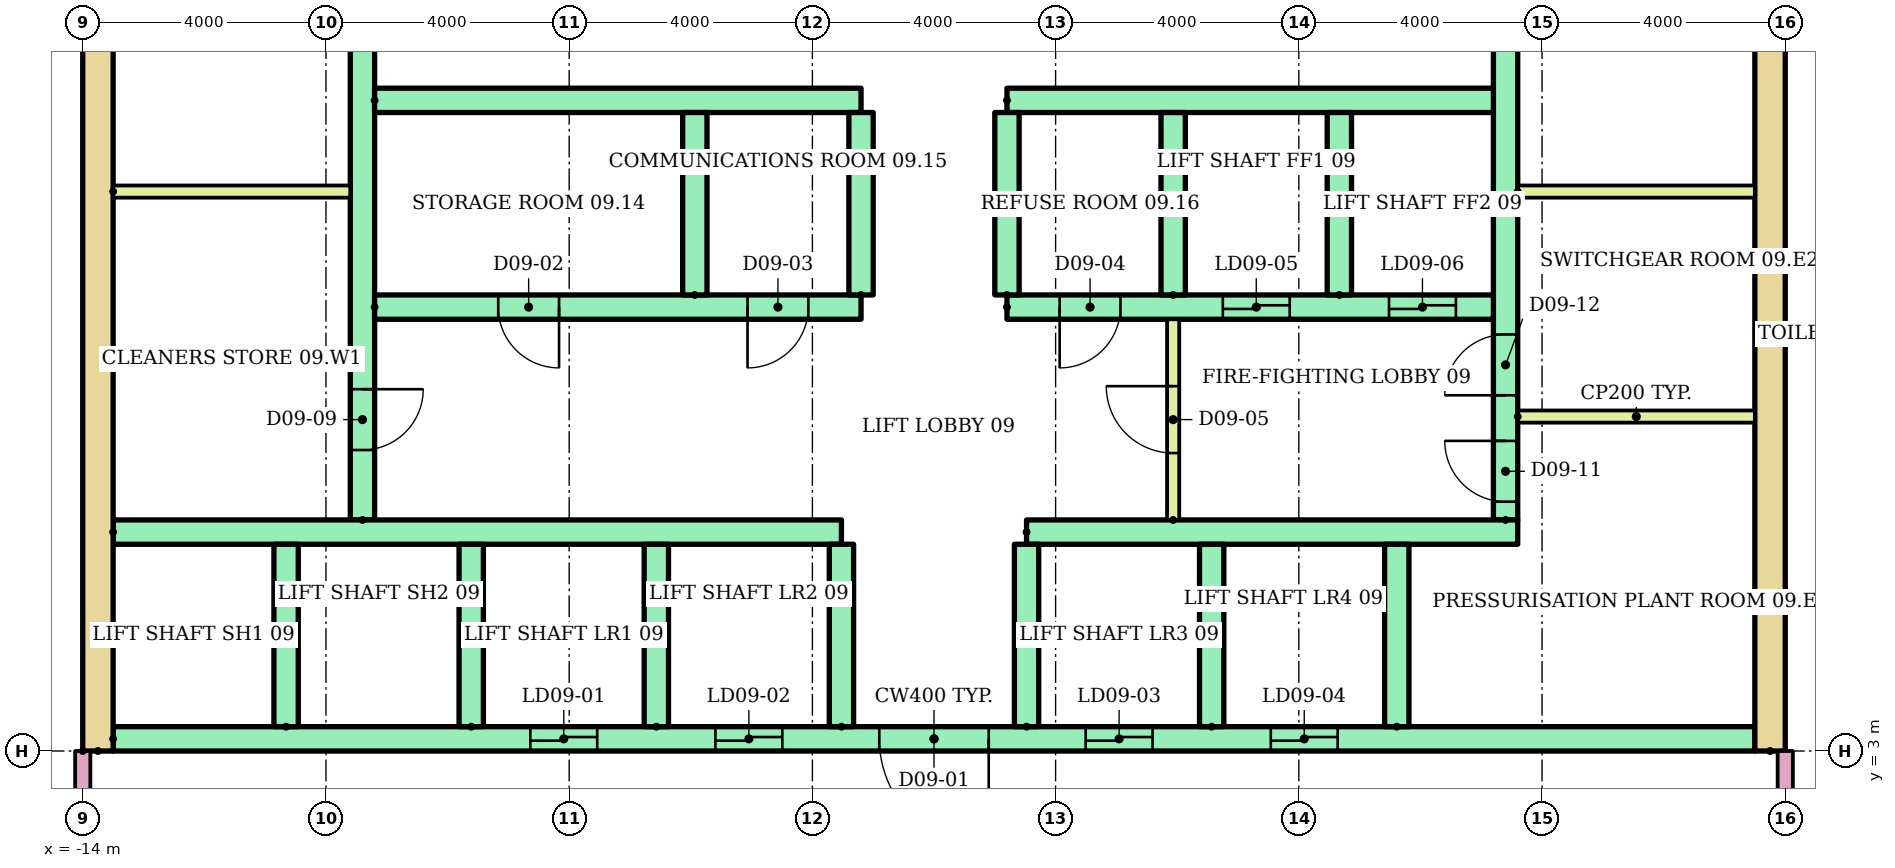
"""IFC4 building model, lengths in metres.
Left out: names, types, materials, properties, quantities, classifications, styles, units other than length and angle.
Written with IfcOpenShell. Run it as: python <this file> out.ifc"""

import sys

from ifc_helpers import new_model, si_unit, direction, frame, frame_2d, origin, place, context, subcontext, project, spatial, rectangle, extrude, element, fill, save


model = new_model("IFC4")
c1 = context("Model", 3, precision=1e-05, world=origin(), true_north=direction((0.0, 1.0)))
c2 = subcontext(c1, "Body", "Model", "MODEL_VIEW")
j1 = project(units=[si_unit("LENGTHUNIT", "METRE"), si_unit("PLANEANGLEUNIT", "RADIAN")], contexts=[c1])
p1 = place(None, origin())
s1 = spatial("IfcSite", under=j1, at=p1, CompositionType="ELEMENT")
p2 = place(p1, origin())
s2 = spatial("IfcBuilding", under=s1, at=p2, CompositionType="ELEMENT")
p3 = place(p2, frame((0.0, 0.0, 37.7)))
s3 = spatial("IfcBuildingStorey", under=s2, at=p3, CompositionType="ELEMENT", Elevation=37.7)
for number, where, z_axis, x_axis in (
    (1, (-13.75, 3.0, 0.0), (0.0, 0.0, 1.0), (0.0, 1.0, 0.0)),
    (2, (13.75, 3.0, 0.0), (0.0, 0.0, 1.0), (0.0, 1.0, 0.0)),
):
    element("IfcWall", number, at=place(p3, frame(where, z_axis=z_axis, x_axis=x_axis)), inside=s3, PredefinedType="SHEAR", context=c2, shape_type="SweptSolid", body=[
        extrude(rectangle(XDim=17.0, YDim=0.5, at=frame_2d((8.5, 0.0))), origin(), (0.0, 0.0, 1.0), 3.62),
    ])
p4 = place(p3, frame((-9.4, 6.8, 0.0), z_axis=(0.0, 0.0, 1.0), x_axis=(0.0, 1.0, 0.0)))
e3 = element("IfcWall", 3, at=p4, inside=s3, PredefinedType="SHEAR", context=c2, shape_type="SweptSolid", body=[
    extrude(rectangle(XDim=12.7, YDim=0.4, at=frame_2d((6.35, 0.0))), origin(), (0.0, 0.0, 1.0), 3.62),
])
p5 = place(p4, frame((1.15, 0.0, 0.0)))
e4 = element("IfcOpeningElement", 4, at=p5, cuts=e3, PredefinedType="OPENING", context=c2, shape_type="SweptSolid", body=[
    extrude(rectangle(XDim=1.0, YDim=2.1, at=frame_2d((0.5, 1.05))), frame((0.0, 0.21, 0.0), z_axis=(0.0, -1.0, 0.0), x_axis=(1.0, 0.0, 0.0)), (0.0, 0.0, 1.0), 0.42),
])
p6 = place(p4, frame((7.925, 0.0, 0.0)))
e5 = element("IfcOpeningElement", 5, at=p6, cuts=e3, PredefinedType="OPENING", context=c2, shape_type="SweptSolid", body=[
    extrude(rectangle(XDim=1.0, YDim=2.1, at=frame_2d((0.5, 1.05))), frame((0.0, 0.21, 0.0), z_axis=(0.0, -1.0, 0.0), x_axis=(1.0, 0.0, 0.0)), (0.0, 0.0, 1.0), 0.42),
])
p7 = place(p3, frame((9.4, 6.8, 0.0), z_axis=(0.0, 0.0, 1.0), x_axis=(0.0, 1.0, 0.0)))
e6 = element("IfcWall", 6, at=p7, inside=s3, PredefinedType="SHEAR", context=c2, shape_type="SweptSolid", body=[
    extrude(rectangle(XDim=12.7, YDim=0.4, at=frame_2d((6.35, 0.0))), origin(), (0.0, 0.0, 1.0), 3.62),
])
p8 = place(p7, frame((0.3, 0.0, 0.0)))
e7 = element("IfcOpeningElement", 7, at=p8, cuts=e6, PredefinedType="OPENING", context=c2, shape_type="SweptSolid", body=[
    extrude(rectangle(XDim=1.0, YDim=2.1, at=frame_2d((0.5, 1.05))), frame((0.0, 0.21, 0.0), z_axis=(0.0, -1.0, 0.0), x_axis=(1.0, 0.0, 0.0)), (0.0, 0.0, 1.0), 0.42),
])
p9 = place(p7, frame((2.05, 0.0, 0.0)))
e8 = element("IfcOpeningElement", 8, at=p9, cuts=e6, PredefinedType="OPENING", context=c2, shape_type="SweptSolid", body=[
    extrude(rectangle(XDim=1.0, YDim=2.1, at=frame_2d((0.5, 1.05))), frame((0.0, 0.21, 0.0), z_axis=(0.0, -1.0, 0.0), x_axis=(1.0, 0.0, 0.0)), (0.0, 0.0, 1.0), 0.42),
])
p10 = place(p7, frame((7.925, 0.0, 0.0)))
e9 = element("IfcOpeningElement", 9, at=p10, cuts=e6, PredefinedType="OPENING", context=c2, shape_type="SweptSolid", body=[
    extrude(rectangle(XDim=1.0, YDim=2.1, at=frame_2d((0.5, 1.05))), frame((0.0, 0.21, 0.0), z_axis=(0.0, -1.0, 0.0), x_axis=(1.0, 0.0, 0.0)), (0.0, 0.0, 1.0), 0.42),
])
p11 = place(p3, frame((-13.5, 3.2, 0.0)))
e10 = element("IfcWall", 10, at=p11, inside=s3, PredefinedType="SHEAR", context=c2, shape_type="SweptSolid", body=[
    extrude(rectangle(XDim=27.0, YDim=0.4, at=frame_2d((13.5, 0.0))), origin(), (0.0, 0.0, 1.0), 3.62),
])
p12 = place(p11, frame((6.861, 0.0, 0.0)))
e11 = element("IfcOpeningElement", 11, at=p12, cuts=e10, PredefinedType="OPENING", context=c2, shape_type="SweptSolid", body=[
    extrude(rectangle(XDim=1.1, YDim=2.1, at=frame_2d((0.55, 1.05))), frame((0.0, 0.21, 0.0), z_axis=(0.0, -1.0, 0.0), x_axis=(1.0, 0.0, 0.0)), (0.0, 0.0, 1.0), 0.42),
])
p13 = place(p11, frame((9.906, 0.0, 0.0)))
e12 = element("IfcOpeningElement", 12, at=p13, cuts=e10, PredefinedType="OPENING", context=c2, shape_type="SweptSolid", body=[
    extrude(rectangle(XDim=1.1, YDim=2.1, at=frame_2d((0.55, 1.05))), frame((0.0, 0.21, 0.0), z_axis=(0.0, -1.0, 0.0), x_axis=(1.0, 0.0, 0.0)), (0.0, 0.0, 1.0), 0.42),
])
p14 = place(p11, frame((15.994, 0.0, 0.0)))
e13 = element("IfcOpeningElement", 13, at=p14, cuts=e10, PredefinedType="OPENING", context=c2, shape_type="SweptSolid", body=[
    extrude(rectangle(XDim=1.1, YDim=2.1, at=frame_2d((0.55, 1.05))), frame((0.0, 0.21, 0.0), z_axis=(0.0, -1.0, 0.0), x_axis=(1.0, 0.0, 0.0)), (0.0, 0.0, 1.0), 0.42),
])
p15 = place(p11, frame((19.039, 0.0, 0.0)))
e14 = element("IfcOpeningElement", 14, at=p15, cuts=e10, PredefinedType="OPENING", context=c2, shape_type="SweptSolid", body=[
    extrude(rectangle(XDim=1.1, YDim=2.1, at=frame_2d((0.55, 1.05))), frame((0.0, 0.21, 0.0), z_axis=(0.0, -1.0, 0.0), x_axis=(1.0, 0.0, 0.0)), (0.0, 0.0, 1.0), 0.42),
])
p16 = place(p11, frame((12.6, 0.0, 0.0)))
e15 = element("IfcOpeningElement", 15, at=p16, cuts=e10, PredefinedType="OPENING", context=c2, shape_type="SweptSolid", body=[
    extrude(rectangle(XDim=1.8, YDim=2.1, at=frame_2d((0.9, 1.05))), frame((0.0, 0.21, 0.0), z_axis=(0.0, -1.0, 0.0), x_axis=(1.0, 0.0, 0.0)), (0.0, 0.0, 1.0), 0.42),
])
p17 = place(p3, frame((-13.5, 6.6, 0.0)))
e16 = element("IfcWall", 16, at=p17, inside=s3, PredefinedType="SHEAR", context=c2, shape_type="SweptSolid", body=[
    extrude(rectangle(XDim=11.978, YDim=0.4, at=frame_2d((5.989, 0.0))), origin(), (0.0, 0.0, 1.0), 3.62),
])
p18 = place(p3, frame((1.522, 6.6, 0.0)))
e17 = element("IfcWall", 17, at=p18, inside=s3, PredefinedType="SHEAR", context=c2, shape_type="SweptSolid", body=[
    extrude(rectangle(XDim=8.078, YDim=0.4, at=frame_2d((4.039, 0.0))), origin(), (0.0, 0.0, 1.0), 3.62),
])
for number, where, z_axis, x_axis in (
    (18, (-10.656, 3.4, 0.0), (0.0, 0.0, 1.0), (0.0, 1.0, 0.0)),
    (19, (-7.611, 3.4, 0.0), (0.0, 0.0, 1.0), (0.0, 1.0, 0.0)),
    (20, (-4.567, 3.4, 0.0), (0.0, 0.0, 1.0), (0.0, 1.0, 0.0)),
    (21, (-1.522, 3.4, 0.0), (0.0, 0.0, 1.0), (0.0, 1.0, 0.0)),
    (22, (1.522, 3.4, 0.0), (0.0, 0.0, 1.0), (0.0, 1.0, 0.0)),
    (23, (4.567, 3.4, 0.0), (0.0, 0.0, 1.0), (0.0, 1.0, 0.0)),
    (24, (7.611, 3.4, 0.0), (0.0, 0.0, 1.0), (0.0, 1.0, 0.0)),
):
    element("IfcWall", number, at=place(p3, frame(where, z_axis=z_axis, x_axis=x_axis)), inside=s3, PredefinedType="SHEAR", context=c2, shape_type="SweptSolid", body=[
        extrude(rectangle(XDim=3.0, YDim=0.4, at=frame_2d((1.5, 0.0))), origin(), (0.0, 0.0, 1.0), 3.62),
    ])
p19 = place(p3, frame((-9.2, 10.3, 0.0)))
e25 = element("IfcWall", 25, at=p19, inside=s3, PredefinedType="SHEAR", context=c2, shape_type="SweptSolid", body=[
    extrude(rectangle(XDim=8.0, YDim=0.4, at=frame_2d((4.0, 0.0))), origin(), (0.0, 0.0, 1.0), 3.62),
])
p20 = place(p19, frame((2.033, 0.0, 0.0)))
e26 = element("IfcOpeningElement", 26, at=p20, cuts=e25, PredefinedType="OPENING", context=c2, shape_type="SweptSolid", body=[
    extrude(rectangle(XDim=1.0, YDim=2.1, at=frame_2d((0.5, 1.05))), frame((0.0, 0.21, 0.0), z_axis=(0.0, -1.0, 0.0), x_axis=(1.0, 0.0, 0.0)), (0.0, 0.0, 1.0), 0.42),
])
p21 = place(p19, frame((6.133, 0.0, 0.0)))
e27 = element("IfcOpeningElement", 27, at=p21, cuts=e25, PredefinedType="OPENING", context=c2, shape_type="SweptSolid", body=[
    extrude(rectangle(XDim=1.0, YDim=2.1, at=frame_2d((0.5, 1.05))), frame((0.0, 0.21, 0.0), z_axis=(0.0, -1.0, 0.0), x_axis=(1.0, 0.0, 0.0)), (0.0, 0.0, 1.0), 0.42),
])
p22 = place(p3, frame((-9.2, 13.7, 0.0)))
e28 = element("IfcWall", 28, at=p22, inside=s3, PredefinedType="SHEAR", context=c2, shape_type="SweptSolid", body=[
    extrude(rectangle(XDim=8.0, YDim=0.4, at=frame_2d((4.0, 0.0))), origin(), (0.0, 0.0, 1.0), 3.62),
])
p23 = place(p3, frame((1.2, 10.3, 0.0)))
e29 = element("IfcWall", 29, at=p23, inside=s3, PredefinedType="SHEAR", context=c2, shape_type="SweptSolid", body=[
    extrude(rectangle(XDim=8.0, YDim=0.4, at=frame_2d((4.0, 0.0))), origin(), (0.0, 0.0, 1.0), 3.62),
])
p24 = place(p23, frame((3.55, 0.0, 0.0)))
e30 = element("IfcOpeningElement", 30, at=p24, cuts=e29, PredefinedType="OPENING", context=c2, shape_type="SweptSolid", body=[
    extrude(rectangle(XDim=1.1, YDim=2.1, at=frame_2d((0.55, 1.05))), frame((0.0, 0.21, 0.0), z_axis=(0.0, -1.0, 0.0), x_axis=(1.0, 0.0, 0.0)), (0.0, 0.0, 1.0), 0.42),
])
p25 = place(p23, frame((6.283, 0.0, 0.0)))
e31 = element("IfcOpeningElement", 31, at=p25, cuts=e29, PredefinedType="OPENING", context=c2, shape_type="SweptSolid", body=[
    extrude(rectangle(XDim=1.1, YDim=2.1, at=frame_2d((0.55, 1.05))), frame((0.0, 0.21, 0.0), z_axis=(0.0, -1.0, 0.0), x_axis=(1.0, 0.0, 0.0)), (0.0, 0.0, 1.0), 0.42),
])
p26 = place(p23, frame((0.867, 0.0, 0.0)))
e32 = element("IfcOpeningElement", 32, at=p26, cuts=e29, PredefinedType="OPENING", context=c2, shape_type="SweptSolid", body=[
    extrude(rectangle(XDim=1.0, YDim=2.1, at=frame_2d((0.5, 1.05))), frame((0.0, 0.21, 0.0), z_axis=(0.0, -1.0, 0.0), x_axis=(1.0, 0.0, 0.0)), (0.0, 0.0, 1.0), 0.42),
])
p27 = place(p3, frame((1.2, 13.7, 0.0)))
e33 = element("IfcWall", 33, at=p27, inside=s3, PredefinedType="SHEAR", context=c2, shape_type="SweptSolid", body=[
    extrude(rectangle(XDim=8.0, YDim=0.4, at=frame_2d((4.0, 0.0))), origin(), (0.0, 0.0, 1.0), 3.62),
])
for number, where, z_axis, x_axis in (
    (34, (-3.933, 10.5, 0.0), (0.0, 0.0, 1.0), (0.0, 1.0, 0.0)),
    (35, (-1.2, 10.5, 0.0), (0.0, 0.0, 1.0), (0.0, 1.0, 0.0)),
    (36, (1.2, 10.5, 0.0), (0.0, 0.0, 1.0), (0.0, 1.0, 0.0)),
    (37, (3.933, 10.5, 0.0), (0.0, 0.0, 1.0), (0.0, 1.0, 0.0)),
    (38, (6.667, 10.5, 0.0), (0.0, 0.0, 1.0), (0.0, 1.0, 0.0)),
):
    element("IfcWall", number, at=place(p3, frame(where, z_axis=z_axis, x_axis=x_axis)), inside=s3, PredefinedType="SHEAR", context=c2, shape_type="SweptSolid", body=[
        extrude(rectangle(XDim=3.0, YDim=0.4, at=frame_2d((1.5, 0.0))), origin(), (0.0, 0.0, 1.0), 3.62),
    ])
p28 = place(p3, frame((3.933, 6.8, 0.0), z_axis=(0.0, 0.0, 1.0), x_axis=(0.0, 1.0, 0.0)))
e39 = element("IfcWall", 39, at=p28, inside=s3, PredefinedType="PARTITIONING", context=c2, shape_type="SweptSolid", body=[
    extrude(rectangle(XDim=3.3, YDim=0.2, at=frame_2d((1.65, 0.0))), origin(), (0.0, 0.0, 1.0), 3.62),
])
p29 = place(p28, frame((1.1, 0.0, 0.0)))
e40 = element("IfcOpeningElement", 40, at=p29, cuts=e39, PredefinedType="OPENING", context=c2, shape_type="SweptSolid", body=[
    extrude(rectangle(XDim=1.1, YDim=2.1, at=frame_2d((0.55, 1.05))), frame((0.0, 0.11, 0.0), z_axis=(0.0, -1.0, 0.0), x_axis=(1.0, 0.0, 0.0)), (0.0, 0.0, 1.0), 0.22),
])
for number, where in (
    (41, (-13.5, 12.2, 0.0)),
    (42, (9.6, 8.5, 0.0)),
    (43, (9.6, 12.2, 0.0)),
):
    element("IfcWall", number, at=place(p3, frame(where)), inside=s3, PredefinedType="PARTITIONING", context=c2, shape_type="SweptSolid", body=[
        extrude(rectangle(XDim=3.9, YDim=0.2, at=frame_2d((1.95, 0.0))), origin(), (0.0, 0.0, 1.0), 3.62),
    ])
for number, where, z_axis, x_axis in (
    (44, (-14.0, 3.0, 0.0), (0.0, 0.0, 1.0), (0.0, -1.0, 0.0)),
    (45, (14.0, 1.4, 0.0), (0.0, 0.0, 1.0), (0.0, 1.0, 0.0)),
):
    element("IfcWall", number, at=place(p3, frame(where, z_axis=z_axis, x_axis=x_axis)), inside=s3, PredefinedType="PARTITIONING", context=c2, shape_type="SweptSolid", body=[
        extrude(rectangle(XDim=1.6, YDim=0.25, at=frame_2d((0.8, 0.0))), origin(), (0.0, 0.0, 1.0), 3.1),
    ])
p30 = place(p12, origin())
e46 = element("IfcDoor", 46, at=p30, inside=s3, OperationType="SLIDING_TO_LEFT", PredefinedType="DOOR", context=c2, shape_type="SweptSolid", body=[
    extrude(rectangle(XDim=1.1, YDim=2.1, at=frame_2d((0.55, 1.05))), frame((0.0, 0.025, 0.0), z_axis=(0.0, -1.0, 0.0), x_axis=(1.0, 0.0, 0.0)), (0.0, 0.0, 1.0), 0.05),
])
fill(e11, e46)
p31 = place(p13, origin())
e47 = element("IfcDoor", 47, at=p31, inside=s3, OperationType="SLIDING_TO_LEFT", PredefinedType="DOOR", context=c2, shape_type="SweptSolid", body=[
    extrude(rectangle(XDim=1.1, YDim=2.1, at=frame_2d((0.55, 1.05))), frame((0.0, 0.025, 0.0), z_axis=(0.0, -1.0, 0.0), x_axis=(1.0, 0.0, 0.0)), (0.0, 0.0, 1.0), 0.05),
])
fill(e12, e47)
p32 = place(p14, origin())
e48 = element("IfcDoor", 48, at=p32, inside=s3, OperationType="SLIDING_TO_LEFT", PredefinedType="DOOR", context=c2, shape_type="SweptSolid", body=[
    extrude(rectangle(XDim=1.1, YDim=2.1, at=frame_2d((0.55, 1.05))), frame((0.0, 0.025, 0.0), z_axis=(0.0, -1.0, 0.0), x_axis=(1.0, 0.0, 0.0)), (0.0, 0.0, 1.0), 0.05),
])
fill(e13, e48)
p33 = place(p15, origin())
e49 = element("IfcDoor", 49, at=p33, inside=s3, OperationType="SLIDING_TO_LEFT", PredefinedType="DOOR", context=c2, shape_type="SweptSolid", body=[
    extrude(rectangle(XDim=1.1, YDim=2.1, at=frame_2d((0.55, 1.05))), frame((0.0, 0.025, 0.0), z_axis=(0.0, -1.0, 0.0), x_axis=(1.0, 0.0, 0.0)), (0.0, 0.0, 1.0), 0.05),
])
fill(e14, e49)
p34 = place(p16, frame((1.8, 0.0, 0.0), z_axis=(0.0, 0.0, 1.0), x_axis=(-1.0, 0.0, 0.0)))
e50 = element("IfcDoor", 50, at=p34, inside=s3, OperationType="DOUBLE_DOOR_SINGLE_SWING", PredefinedType="DOOR", context=c2, shape_type="SweptSolid", body=[
    extrude(rectangle(XDim=1.8, YDim=2.1, at=frame_2d((0.9, 1.05))), frame((0.0, 0.025, 0.0), z_axis=(0.0, -1.0, 0.0), x_axis=(1.0, 0.0, 0.0)), (0.0, 0.0, 1.0), 0.05),
])
fill(e15, e50)
p35 = place(p24, origin())
e51 = element("IfcDoor", 51, at=p35, inside=s3, OperationType="SLIDING_TO_LEFT", PredefinedType="DOOR", context=c2, shape_type="SweptSolid", body=[
    extrude(rectangle(XDim=1.1, YDim=2.1, at=frame_2d((0.55, 1.05))), frame((0.0, 0.025, 0.0), z_axis=(0.0, -1.0, 0.0), x_axis=(1.0, 0.0, 0.0)), (0.0, 0.0, 1.0), 0.05),
])
fill(e30, e51)
p36 = place(p25, origin())
e52 = element("IfcDoor", 52, at=p36, inside=s3, OperationType="SLIDING_TO_LEFT", PredefinedType="DOOR", context=c2, shape_type="SweptSolid", body=[
    extrude(rectangle(XDim=1.1, YDim=2.1, at=frame_2d((0.55, 1.05))), frame((0.0, 0.025, 0.0), z_axis=(0.0, -1.0, 0.0), x_axis=(1.0, 0.0, 0.0)), (0.0, 0.0, 1.0), 0.05),
])
fill(e31, e52)
p37 = place(p20, frame((1.0, 0.0, 0.0), z_axis=(0.0, 0.0, 1.0), x_axis=(-1.0, 0.0, 0.0)))
e53 = element("IfcDoor", 53, at=p37, inside=s3, OperationType="SINGLE_SWING_RIGHT", PredefinedType="DOOR", context=c2, shape_type="SweptSolid", body=[
    extrude(rectangle(XDim=1.0, YDim=2.1, at=frame_2d((0.5, 1.05))), frame((0.0, 0.025, 0.0), z_axis=(0.0, -1.0, 0.0), x_axis=(1.0, 0.0, 0.0)), (0.0, 0.0, 1.0), 0.05),
])
fill(e26, e53)
p38 = place(p21, frame((1.0, 0.0, 0.0), z_axis=(0.0, 0.0, 1.0), x_axis=(-1.0, 0.0, 0.0)))
e54 = element("IfcDoor", 54, at=p38, inside=s3, OperationType="SINGLE_SWING_LEFT", PredefinedType="DOOR", context=c2, shape_type="SweptSolid", body=[
    extrude(rectangle(XDim=1.0, YDim=2.1, at=frame_2d((0.5, 1.05))), frame((0.0, 0.025, 0.0), z_axis=(0.0, -1.0, 0.0), x_axis=(1.0, 0.0, 0.0)), (0.0, 0.0, 1.0), 0.05),
])
fill(e27, e54)
p39 = place(p26, frame((1.0, 0.0, 0.0), z_axis=(0.0, 0.0, 1.0), x_axis=(-1.0, 0.0, 0.0)))
e55 = element("IfcDoor", 55, at=p39, inside=s3, OperationType="SINGLE_SWING_LEFT", PredefinedType="DOOR", context=c2, shape_type="SweptSolid", body=[
    extrude(rectangle(XDim=1.0, YDim=2.1, at=frame_2d((0.5, 1.05))), frame((0.0, 0.025, 0.0), z_axis=(0.0, -1.0, 0.0), x_axis=(1.0, 0.0, 0.0)), (0.0, 0.0, 1.0), 0.05),
])
fill(e32, e55)
p40 = place(p29, origin())
e56 = element("IfcDoor", 56, at=p40, inside=s3, OperationType="SINGLE_SWING_RIGHT", PredefinedType="DOOR", context=c2, shape_type="SweptSolid", body=[
    extrude(rectangle(XDim=1.1, YDim=2.1, at=frame_2d((0.55, 1.05))), frame((0.0, 0.025, 0.0), z_axis=(0.0, -1.0, 0.0), x_axis=(1.0, 0.0, 0.0)), (0.0, 0.0, 1.0), 0.05),
])
fill(e40, e56)
p41 = place(p5, frame((1.0, 0.0, 0.0), z_axis=(0.0, 0.0, 1.0), x_axis=(-1.0, 0.0, 0.0)))
e57 = element("IfcDoor", 57, at=p41, inside=s3, OperationType="SINGLE_SWING_RIGHT", PredefinedType="DOOR", context=c2, shape_type="SweptSolid", body=[
    extrude(rectangle(XDim=1.0, YDim=2.1, at=frame_2d((0.5, 1.05))), frame((0.0, 0.025, 0.0), z_axis=(0.0, -1.0, 0.0), x_axis=(1.0, 0.0, 0.0)), (0.0, 0.0, 1.0), 0.05),
])
fill(e4, e57)
p42 = place(p8, origin())
e58 = element("IfcDoor", 58, at=p42, inside=s3, OperationType="SINGLE_SWING_RIGHT", PredefinedType="DOOR", context=c2, shape_type="SweptSolid", body=[
    extrude(rectangle(XDim=1.0, YDim=2.1, at=frame_2d((0.5, 1.05))), frame((0.0, 0.025, 0.0), z_axis=(0.0, -1.0, 0.0), x_axis=(1.0, 0.0, 0.0)), (0.0, 0.0, 1.0), 0.05),
])
fill(e7, e58)
p43 = place(p9, origin())
e59 = element("IfcDoor", 59, at=p43, inside=s3, OperationType="SINGLE_SWING_LEFT", PredefinedType="DOOR", context=c2, shape_type="SweptSolid", body=[
    extrude(rectangle(XDim=1.0, YDim=2.1, at=frame_2d((0.5, 1.05))), frame((0.0, 0.025, 0.0), z_axis=(0.0, -1.0, 0.0), x_axis=(1.0, 0.0, 0.0)), (0.0, 0.0, 1.0), 0.05),
])
fill(e8, e59)
save(model, sys.argv[1])
